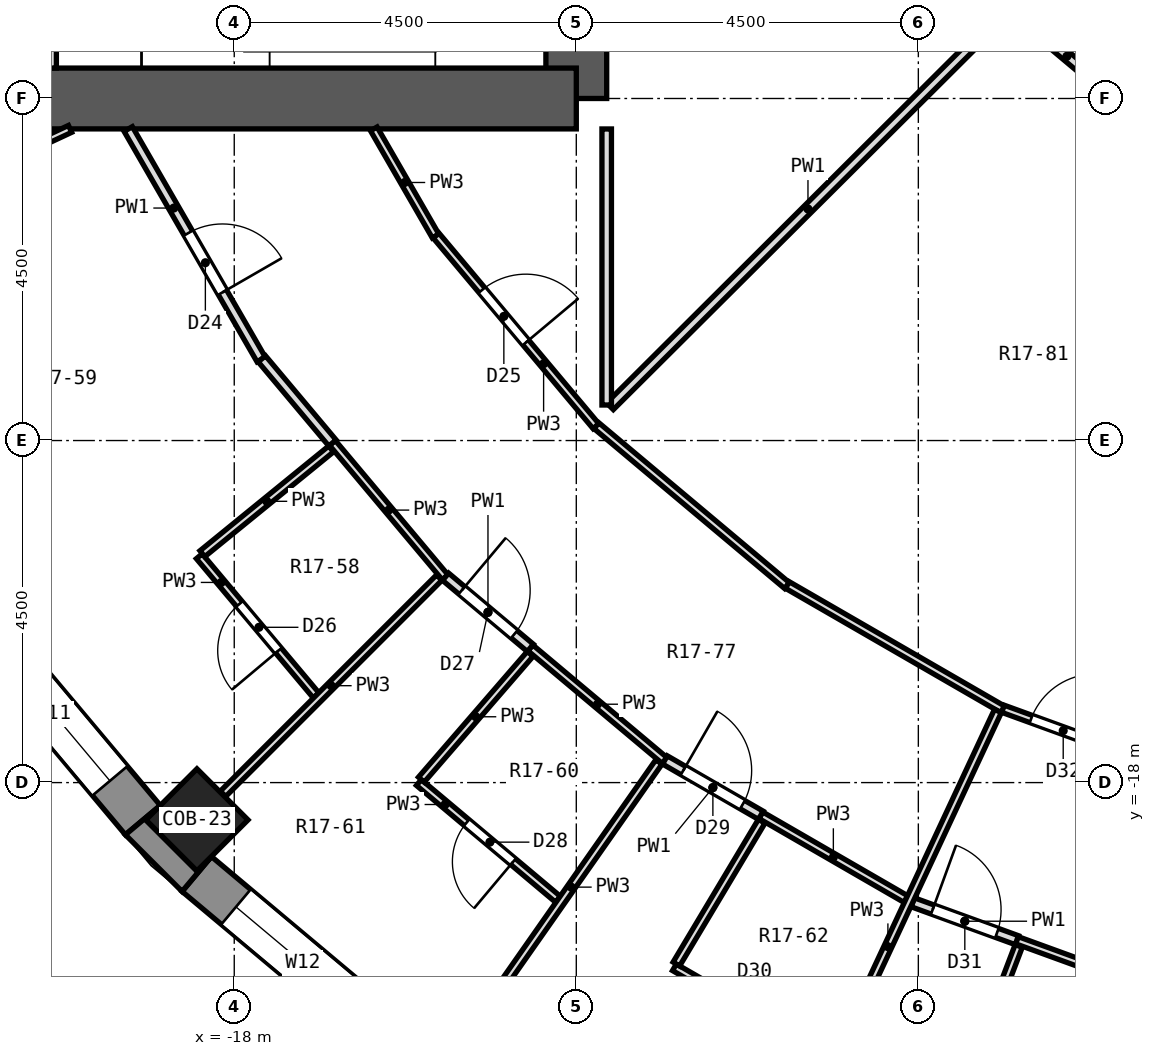
"""IFC4 building model, lengths in metres.
Left out: names, types, materials, properties, quantities, classifications, styles, units other than length and angle.
Written with IfcOpenShell. Run it as: python <this file> out.ifc"""

import sys

from ifc_helpers import new_model, si_unit, direction, frame, frame_2d, origin, origin_2d, place, context, subcontext, project, spatial, polyline, rectangle, outline, extrude, element, fill, save


model = new_model("IFC4")
c1 = context("Model", 3, precision=1e-05, world=origin(), true_north=direction((0.0, 1.0)))
c2 = subcontext(c1, "Body", "Model", "MODEL_VIEW")
j1 = project(units=[si_unit("LENGTHUNIT", "METRE"), si_unit("PLANEANGLEUNIT", "RADIAN")], contexts=[c1])
p1 = place(None, origin())
s1 = spatial("IfcSite", under=j1, at=p1, CompositionType="ELEMENT")
p2 = place(p1, origin())
s2 = spatial("IfcBuilding", under=s1, at=p2, CompositionType="ELEMENT")
p3 = place(p2, frame((0.0, 0.0, 91.9)))
s3 = spatial("IfcBuildingStorey", under=s2, at=p3, CompositionType="ELEMENT", Elevation=91.9)
p4 = place(p3, frame((-18.491, -18.491, 0.0), z_axis=(0.0, 0.0, 1.0), x_axis=(-0.707106781187, -0.707106781187, 0.0)))
e1 = element("IfcColumn", 1, at=p4, inside=s3, PredefinedType="COLUMN", context=c2, shape_type="SweptSolid", body=[
    extrude(rectangle(XDim=0.95, YDim=0.95, at=origin_2d()), origin(), (0.0, 0.0, 1.0), 3.3),
])
p5 = place(p3, frame((-13.5, -9.0, 0.0), z_axis=(0.0, 0.0, 1.0), x_axis=(0.0, 1.0, 0.0)))
e2 = element("IfcWall", 2, at=p5, inside=s3, PredefinedType="SHEAR", context=c2, shape_type="SweptSolid", body=[
    extrude(rectangle(XDim=18.0, YDim=0.8, at=frame_2d((9.0, 0.0))), origin(), (0.0, 0.0, 1.0), 3.3),
])
p6 = place(p5, frame((15.4, 0.0, 0.0)))
e3 = element("IfcOpeningElement", 3, at=p6, cuts=e2, PredefinedType="OPENING", context=c2, shape_type="SweptSolid", body=[
    extrude(rectangle(XDim=1.2, YDim=2.1, at=frame_2d((0.6, 1.05))), frame((0.0, 0.412, 0.0), z_axis=(0.0, -1.0, 0.0), x_axis=(1.0, 0.0, 0.0)), (0.0, 0.0, 1.0), 0.824),
])
p7 = place(p5, frame((1.4, 0.0, 0.0)))
e4 = element("IfcOpeningElement", 4, at=p7, cuts=e2, PredefinedType="OPENING", context=c2, shape_type="SweptSolid", body=[
    extrude(rectangle(XDim=1.2, YDim=2.1, at=frame_2d((0.6, 1.05))), frame((0.0, 0.412, 0.0), z_axis=(0.0, -1.0, 0.0), x_axis=(1.0, 0.0, 0.0)), (0.0, 0.0, 1.0), 0.824),
])
p8 = place(p5, frame((7.5, 0.0, 0.0)))
e5 = element("IfcOpeningElement", 5, at=p8, cuts=e2, PredefinedType="OPENING", context=c2, shape_type="SweptSolid", body=[
    extrude(rectangle(XDim=3.0, YDim=2.4, at=frame_2d((1.5, 1.2))), frame((0.0, 0.412, 0.0), z_axis=(0.0, -1.0, 0.0), x_axis=(1.0, 0.0, 0.0)), (0.0, 0.0, 1.0), 0.824),
])
p9 = place(p3, frame((-13.5, -9.0, 0.0), z_axis=(0.0, 0.0, 1.0), x_axis=(-1.0, 0.0, 0.0)))
e6 = element("IfcWall", 6, at=p9, inside=s3, PredefinedType="SHEAR", context=c2, shape_type="SweptSolid", body=[
    extrude(rectangle(XDim=10.4, YDim=0.8, at=frame_2d((5.2, 0.0))), origin(), (0.0, 0.0, 1.0), 3.3),
])
p10 = place(p3, frame((-21.547, -15.699, 0.0), z_axis=(0.0, 0.0, 1.0), x_axis=(0.642774476932, -0.766055462616, 0.0)))
e7 = element("IfcWall", 7, at=p10, inside=s3, PredefinedType="SOLIDWALL", context=c2, shape_type="SweptSolid", body=[
    extrude(rectangle(XDim=3.648, YDim=0.6, at=frame_2d((1.824, 0.0))), origin(), (0.0, 0.0, 1.0), 2.8),
])
p11 = place(p10, frame((0.674, 0.0, 0.9)))
e8 = element("IfcOpeningElement", 8, at=p11, cuts=e7, PredefinedType="OPENING", context=c2, shape_type="SweptSolid", body=[
    extrude(rectangle(XDim=2.3, YDim=1.8, at=frame_2d((1.15, 0.9))), frame((0.0, 0.312, 0.0), z_axis=(0.0, -1.0, 0.0), x_axis=(1.0, 0.0, 0.0)), (0.0, 0.0, 1.0), 0.624),
])
p12 = place(p3, frame((-18.494, -19.202, 0.0), z_axis=(0.0, 0.0, 1.0), x_axis=(0.766055462616, -0.642774476932, 0.0)))
e9 = element("IfcWall", 9, at=p12, inside=s3, PredefinedType="SOLIDWALL", context=c2, shape_type="SweptSolid", body=[
    extrude(rectangle(XDim=3.648, YDim=0.6, at=frame_2d((1.824, 0.0))), origin(), (0.0, 0.0, 1.0), 2.8),
])
p13 = place(p12, frame((0.674, 0.0, 0.9)))
e10 = element("IfcOpeningElement", 10, at=p13, cuts=e9, PredefinedType="OPENING", context=c2, shape_type="SweptSolid", body=[
    extrude(rectangle(XDim=2.3, YDim=1.8, at=frame_2d((1.15, 0.9))), frame((0.0, 0.312, 0.0), z_axis=(0.0, -1.0, 0.0), x_axis=(1.0, 0.0, 0.0)), (0.0, 0.0, 1.0), 0.624),
])
p14 = place(p3, origin())
e11 = element("IfcWall", 11, at=p14, inside=s3, PredefinedType="SOLIDWALL", context=c2, shape_type="SweptSolid", body=[
    extrude(outline(polyline([(-19.432, -18.686), (-18.686, -19.432), (-18.301, -18.972), (-18.491, -19.163), (-19.163, -18.491), (-18.972, -18.301), (-19.432, -18.686)])), origin(), (0.0, 0.0, 1.0), 2.8),
])
p15 = place(p3, frame((-19.395, -9.402, 0.0), z_axis=(0.0, 0.0, 1.0), x_axis=(0.499726480438, -0.866183262797, 0.0)))
e12 = element("IfcWall", 12, at=p15, inside=s3, PredefinedType="PARTITIONING", context=c2, shape_type="SweptSolid", body=[
    extrude(rectangle(XDim=3.499, YDim=0.125, at=frame_2d((1.75, 0.0))), origin(), (0.0, 0.0, 1.0), 2.8),
])
p16 = place(p15, frame((1.581, 0.0, 0.0)))
e13 = element("IfcOpeningElement", 13, at=p16, cuts=e12, PredefinedType="OPENING", context=c2, shape_type="SweptSolid", body=[
    extrude(rectangle(XDim=0.9, YDim=2.1, at=frame_2d((0.45, 1.05))), frame((0.0, 0.074, 0.0), z_axis=(0.0, -1.0, 0.0), x_axis=(1.0, 0.0, 0.0)), (0.0, 0.0, 1.0), 0.149),
])
p17 = place(p3, frame((-16.164, -9.4, 0.0), z_axis=(0.0, 0.0, 1.0), x_axis=(0.499687832671, -0.866205558676, 0.0)))
e14 = element("IfcWall", 14, at=p17, inside=s3, PredefinedType="PARTITIONING", context=c2, shape_type="SweptSolid", body=[
    extrude(rectangle(XDim=1.628, YDim=0.1, at=frame_2d((0.814, 0.0))), origin(), (0.0, 0.0, 1.0), 2.8),
])
p18 = place(p3, frame((-18.46, -15.022, 0.0), z_axis=(0.0, 0.0, 1.0), x_axis=(0.642942941421, -0.765914077477, 0.0)))
e15 = element("IfcWall", 15, at=p18, inside=s3, PredefinedType="PARTITIONING", context=c2, shape_type="SweptSolid", body=[
    extrude(rectangle(XDim=2.39, YDim=0.1, at=frame_2d((1.195, 0.0))), origin(), (0.0, 0.0, 1.0), 2.8),
])
p19 = place(p18, frame((0.821, 0.0, 0.0)))
e16 = element("IfcOpeningElement", 16, at=p19, cuts=e15, PredefinedType="OPENING", context=c2, shape_type="SweptSolid", body=[
    extrude(rectangle(XDim=0.8, YDim=2.1, at=frame_2d((0.4, 1.05))), frame((0.0, 0.062, 0.0), z_axis=(0.0, -1.0, 0.0), x_axis=(1.0, 0.0, 0.0)), (0.0, 0.0, 1.0), 0.124),
])
p20 = place(p3, frame((-16.708, -13.532, 0.0), z_axis=(0.0, 0.0, 1.0), x_axis=(0.642762571273, -0.766065452145, 0.0)))
e17 = element("IfcWall", 17, at=p20, inside=s3, PredefinedType="PARTITIONING", context=c2, shape_type="SweptSolid", body=[
    extrude(rectangle(XDim=2.307, YDim=0.1, at=frame_2d((1.153, 0.0))), origin(), (0.0, 0.0, 1.0), 2.8),
])
p21 = place(p3, frame((-17.637, -12.425, 0.0), z_axis=(0.0, 0.0, 1.0), x_axis=(0.642641061866, -0.766167387458, 0.0)))
e18 = element("IfcWall", 18, at=p21, inside=s3, PredefinedType="PARTITIONING", context=c2, shape_type="SweptSolid", body=[
    extrude(rectangle(XDim=1.445, YDim=0.125, at=frame_2d((0.722, 0.0))), origin(), (0.0, 0.0, 1.0), 2.8),
])
p22 = place(p3, frame((-15.344, -10.804, 0.0), z_axis=(0.0, 0.0, 1.0), x_axis=(0.642602374159, -0.766199836025, 0.0)))
e19 = element("IfcWall", 19, at=p22, inside=s3, PredefinedType="PARTITIONING", context=c2, shape_type="SweptSolid", body=[
    extrude(rectangle(XDim=3.273, YDim=0.1, at=frame_2d((1.636, 0.0))), origin(), (0.0, 0.0, 1.0), 2.8),
])
p23 = place(p22, frame((0.936, 0.0, 0.0)))
e20 = element("IfcOpeningElement", 20, at=p23, cuts=e19, PredefinedType="OPENING", context=c2, shape_type="SweptSolid", body=[
    extrude(rectangle(XDim=0.9, YDim=2.1, at=frame_2d((0.45, 1.05))), frame((0.0, 0.062, 0.0), z_axis=(0.0, -1.0, 0.0), x_axis=(1.0, 0.0, 0.0)), (0.0, 0.0, 1.0), 0.124),
])
p24 = place(p3, frame((-15.571, -17.999, 0.0), z_axis=(0.0, 0.0, 1.0), x_axis=(0.765914077477, -0.642942941421, 0.0)))
e21 = element("IfcWall", 21, at=p24, inside=s3, PredefinedType="PARTITIONING", context=c2, shape_type="SweptSolid", body=[
    extrude(rectangle(XDim=2.39, YDim=0.1, at=frame_2d((1.195, 0.0))), origin(), (0.0, 0.0, 1.0), 2.8),
])
p25 = place(p24, frame((0.82, 0.0, 0.0)))
e22 = element("IfcOpeningElement", 22, at=p25, cuts=e21, PredefinedType="OPENING", context=c2, shape_type="SweptSolid", body=[
    extrude(rectangle(XDim=0.8, YDim=2.1, at=frame_2d((0.4, 1.05))), frame((0.0, 0.062, 0.0), z_axis=(0.0, -1.0, 0.0), x_axis=(1.0, 0.0, 0.0)), (0.0, 0.0, 1.0), 0.124),
])
p26 = place(p3, frame((-14.104, -16.228, 0.0), z_axis=(0.0, 0.0, 1.0), x_axis=(0.76604687987, -0.642784705669, 0.0)))
e23 = element("IfcWall", 23, at=p26, inside=s3, PredefinedType="PARTITIONING", context=c2, shape_type="SweptSolid", body=[
    extrude(rectangle(XDim=2.305, YDim=0.1, at=frame_2d((1.153, 0.0))), origin(), (0.0, 0.0, 1.0), 2.8),
])
p27 = place(p3, frame((-15.22, -15.292, 0.0), z_axis=(0.0, 0.0, 1.0), x_axis=(0.766114305984, -0.642704341177, 0.0)))
e24 = element("IfcWall", 24, at=p27, inside=s3, PredefinedType="PARTITIONING", context=c2, shape_type="SweptSolid", body=[
    extrude(rectangle(XDim=1.456, YDim=0.125, at=frame_2d((0.728, 0.0))), origin(), (0.0, 0.0, 1.0), 2.8),
])
p28 = place(p27, frame((0.278, 0.0, 0.0)))
e25 = element("IfcOpeningElement", 25, at=p28, cuts=e24, PredefinedType="OPENING", context=c2, shape_type="SweptSolid", body=[
    extrude(rectangle(XDim=0.9, YDim=2.1, at=frame_2d((0.45, 1.05))), frame((0.0, 0.074, 0.0), z_axis=(0.0, -1.0, 0.0), x_axis=(1.0, 0.0, 0.0)), (0.0, 0.0, 1.0), 0.149),
])
p29 = place(p3, frame((-13.235, -13.305, 0.0), z_axis=(0.0, 0.0, 1.0), x_axis=(0.766132303871, -0.642682886784, 0.0)))
e26 = element("IfcWall", 26, at=p29, inside=s3, PredefinedType="PARTITIONING", context=c2, shape_type="SweptSolid", body=[
    extrude(rectangle(XDim=3.273, YDim=0.1, at=frame_2d((1.636, 0.0))), origin(), (0.0, 0.0, 1.0), 2.8),
])
p30 = place(p3, frame((-7.807, -7.806, 0.0), z_axis=(0.0, 0.0, 1.0), x_axis=(0.766164240715, -0.642644813446, 0.0)))
e27 = element("IfcWall", 27, at=p30, inside=s3, PredefinedType="PARTITIONING", context=c2, shape_type="SweptSolid", body=[
    extrude(rectangle(XDim=1.988, YDim=0.125, at=frame_2d((0.994, 0.0))), origin(), (0.0, 0.0, 1.0), 2.8),
])
p31 = place(p3, frame((-12.209, -20.43, 0.0), z_axis=(0.0, 0.0, 1.0), x_axis=(0.865989934965, -0.500061428766, 0.0)))
e28 = element("IfcWall", 28, at=p31, inside=s3, PredefinedType="PARTITIONING", context=c2, shape_type="SweptSolid", body=[
    extrude(rectangle(XDim=2.39, YDim=0.1, at=frame_2d((1.195, 0.0))), origin(), (0.0, 0.0, 1.0), 2.8),
])
p32 = place(p31, frame((0.82, 0.0, 0.0)))
e29 = element("IfcOpeningElement", 29, at=p32, cuts=e28, PredefinedType="OPENING", context=c2, shape_type="SweptSolid", body=[
    extrude(rectangle(XDim=0.8, YDim=2.1, at=frame_2d((0.4, 1.05))), frame((0.0, 0.062, 0.0), z_axis=(0.0, -1.0, 0.0), x_axis=(1.0, 0.0, 0.0)), (0.0, 0.0, 1.0), 0.124),
])
p33 = place(p3, frame((-11.072, -18.43, 0.0), z_axis=(0.0, 0.0, 1.0), x_axis=(0.865848017448, -0.500307116361, 0.0)))
e30 = element("IfcWall", 30, at=p33, inside=s3, PredefinedType="PARTITIONING", context=c2, shape_type="SweptSolid", body=[
    extrude(rectangle(XDim=2.205, YDim=0.1, at=frame_2d((1.102, 0.0))), origin(), (0.0, 0.0, 1.0), 2.8),
])
p34 = place(p3, frame((-12.334, -17.702, 0.0), z_axis=(0.0, 0.0, 1.0), x_axis=(0.866110229381, -0.499853048967, 0.0)))
e31 = element("IfcWall", 31, at=p34, inside=s3, PredefinedType="PARTITIONING", context=c2, shape_type="SweptSolid", body=[
    extrude(rectangle(XDim=1.457, YDim=0.125, at=frame_2d((0.728, 0.0))), origin(), (0.0, 0.0, 1.0), 2.8),
])
p35 = place(p34, frame((0.278, 0.0, 0.0)))
e32 = element("IfcOpeningElement", 32, at=p35, cuts=e31, PredefinedType="OPENING", context=c2, shape_type="SweptSolid", body=[
    extrude(rectangle(XDim=0.9, YDim=2.1, at=frame_2d((0.45, 1.05))), frame((0.0, 0.074, 0.0), z_axis=(0.0, -1.0, 0.0), x_axis=(1.0, 0.0, 0.0)), (0.0, 0.0, 1.0), 0.149),
])
p36 = place(p3, frame((-10.723, -15.401, 0.0), z_axis=(0.0, 0.0, 1.0), x_axis=(0.866002935623, -0.500038913978, 0.0)))
e33 = element("IfcWall", 33, at=p36, inside=s3, PredefinedType="PARTITIONING", context=c2, shape_type="SweptSolid", body=[
    extrude(rectangle(XDim=3.272, YDim=0.1, at=frame_2d((1.636, 0.0))), origin(), (0.0, 0.0, 1.0), 2.8),
])
p37 = place(p3, frame((-7.704, -20.073, 0.0), z_axis=(0.0, 0.0, 1.0), x_axis=(0.939734670151, -0.34190459154, 0.0)))
e34 = element("IfcWall", 34, at=p37, inside=s3, PredefinedType="PARTITIONING", context=c2, shape_type="SweptSolid", body=[
    extrude(rectangle(XDim=2.306, YDim=0.1, at=frame_2d((1.153, 0.0))), origin(), (0.0, 0.0, 1.0), 2.8),
])
p38 = place(p3, frame((-9.073, -19.575, 0.0), z_axis=(0.0, 0.0, 1.0), x_axis=(0.939788529673, -0.341756520778, 0.0)))
e35 = element("IfcWall", 35, at=p38, inside=s3, PredefinedType="PARTITIONING", context=c2, shape_type="SweptSolid", body=[
    extrude(rectangle(XDim=1.457, YDim=0.125, at=frame_2d((0.728, 0.0))), origin(), (0.0, 0.0, 1.0), 2.8),
])
p39 = place(p38, frame((0.278, 0.0, 0.0)))
e36 = element("IfcOpeningElement", 36, at=p39, cuts=e35, PredefinedType="OPENING", context=c2, shape_type="SweptSolid", body=[
    extrude(rectangle(XDim=0.9, YDim=2.1, at=frame_2d((0.45, 1.05))), frame((0.0, 0.074, 0.0), z_axis=(0.0, -1.0, 0.0), x_axis=(1.0, 0.0, 0.0)), (0.0, 0.0, 1.0), 0.149),
])
p40 = place(p3, frame((-7.886, -17.029, 0.0), z_axis=(0.0, 0.0, 1.0), x_axis=(0.939806110693, -0.341708171258, 0.0)))
e37 = element("IfcWall", 37, at=p40, inside=s3, PredefinedType="PARTITIONING", context=c2, shape_type="SweptSolid", body=[
    extrude(rectangle(XDim=1.686, YDim=0.1, at=frame_2d((0.843, 0.0))), origin(), (0.0, 0.0, 1.0), 2.8),
])
p41 = place(p40, frame((0.393, 0.0, 0.0)))
e38 = element("IfcOpeningElement", 38, at=p41, cuts=e37, PredefinedType="OPENING", context=c2, shape_type="SweptSolid", body=[
    extrude(rectangle(XDim=0.9, YDim=2.1, at=frame_2d((0.45, 1.05))), frame((0.0, 0.062, 0.0), z_axis=(0.0, -1.0, 0.0), x_axis=(1.0, 0.0, 0.0)), (0.0, 0.0, 1.0), 0.124),
])
p42 = place(p3, frame((-23.26, -10.847, 0.0), z_axis=(0.0, 0.0, 1.0), x_axis=(0.906121146584, 0.423018282954, 0.0)))
e39 = element("IfcWall", 39, at=p42, inside=s3, PredefinedType="PARTITIONING", context=c2, shape_type="SweptSolid", body=[
    extrude(rectangle(XDim=3.421, YDim=0.1, at=frame_2d((1.711, 0.0))), origin(), (0.0, 0.0, 1.0), 2.8),
])
p43 = place(p3, frame((-18.419, -14.989, 0.0), z_axis=(0.0, 0.0, 1.0), x_axis=(0.775583643893, 0.63124481093, 0.0)))
e40 = element("IfcWall", 40, at=p43, inside=s3, PredefinedType="PARTITIONING", context=c2, shape_type="SweptSolid", body=[
    extrude(rectangle(XDim=2.184, YDim=0.1, at=frame_2d((1.092, 0.0))), origin(), (0.0, 0.0, 1.0), 2.8),
])
p44 = place(p3, frame((-13.057, -13.049, 0.0), z_axis=(0.0, 0.0, 1.0), x_axis=(0.708367099834, 0.705844212183, 0.0)))
e41 = element("IfcWall", 41, at=p44, inside=s3, PredefinedType="PARTITIONING", context=c2, shape_type="SweptSolid", body=[
    extrude(rectangle(XDim=7.354, YDim=0.125, at=frame_2d((3.677, 0.0))), origin(), (0.0, 0.0, 1.0), 2.8),
])
p45 = place(p3, frame((-18.148, -18.148, 0.0), z_axis=(0.0, 0.0, 1.0), x_axis=(0.707106781187, 0.707106781187, 0.0)))
e42 = element("IfcWall", 42, at=p45, inside=s3, PredefinedType="PARTITIONING", context=c2, shape_type="SweptSolid", body=[
    extrude(rectangle(XDim=4.023, YDim=0.1, at=frame_2d((2.011, 0.0))), origin(), (0.0, 0.0, 1.0), 2.8),
])
p46 = place(p3, frame((-15.538, -17.961, 0.0), z_axis=(0.0, 0.0, 1.0), x_axis=(0.654433202149, 0.756119821143, 0.0)))
e43 = element("IfcWall", 43, at=p46, inside=s3, PredefinedType="PARTITIONING", context=c2, shape_type="SweptSolid", body=[
    extrude(rectangle(XDim=2.187, YDim=0.1, at=frame_2d((1.094, 0.0))), origin(), (0.0, 0.0, 1.0), 2.8),
])
p47 = place(p3, frame((-14.721, -21.023, 0.0), z_axis=(0.0, 0.0, 1.0), x_axis=(0.573849206175, 0.818960981105, 0.0)))
e44 = element("IfcWall", 44, at=p47, inside=s3, PredefinedType="PARTITIONING", context=c2, shape_type="SweptSolid", body=[
    extrude(rectangle(XDim=4.023, YDim=0.1, at=frame_2d((2.011, 0.0))), origin(), (0.0, 0.0, 1.0), 2.8),
])
p48 = place(p3, frame((-12.183, -20.387, 0.0), z_axis=(0.0, 0.0, 1.0), x_axis=(0.512903306279, 0.85844638645, 0.0)))
e45 = element("IfcWall", 45, at=p48, inside=s3, PredefinedType="PARTITIONING", context=c2, shape_type="SweptSolid", body=[
    extrude(rectangle(XDim=2.188, YDim=0.1, at=frame_2d((1.094, 0.0))), origin(), (0.0, 0.0, 1.0), 2.8),
])
p49 = place(p3, frame((-10.848, -23.26, 0.0), z_axis=(0.0, 0.0, 1.0), x_axis=(0.422908898334, 0.906172204225, 0.0)))
e46 = element("IfcWall", 46, at=p49, inside=s3, PredefinedType="PARTITIONING", context=c2, shape_type="SweptSolid", body=[
    extrude(rectangle(XDim=6.844, YDim=0.1, at=frame_2d((3.422, 0.0))), origin(), (0.0, 0.0, 1.0), 2.8),
])
p50 = place(p3, frame((-8.458, -22.192, 0.0), z_axis=(0.0, 0.0, 1.0), x_axis=(0.356134598474, 0.93443466747, 0.0)))
e47 = element("IfcWall", 47, at=p50, inside=s3, PredefinedType="PARTITIONING", context=c2, shape_type="SweptSolid", body=[
    extrude(rectangle(XDim=2.187, YDim=0.1, at=frame_2d((1.093, 0.0))), origin(), (0.0, 0.0, 1.0), 2.8),
])
p51 = place(p3, frame((-13.1, -13.032, 0.0), z_axis=(0.0, 0.0, 1.0), x_axis=(0.0, 1.0, 0.0)))
e48 = element("IfcWall", 48, at=p51, inside=s3, PredefinedType="PARTITIONING", context=c2, shape_type="SweptSolid", body=[
    extrude(rectangle(XDim=3.632, YDim=0.125, at=frame_2d((1.816, 0.0))), origin(), (0.0, 0.0, 1.0), 2.8),
])
p52 = place(p3, frame((-20.39, -8.6, 0.0), z_axis=(0.0, 0.0, 1.0), x_axis=(0.0, 1.0, 0.0)))
e49 = element("IfcWall", 49, at=p52, inside=s3, PredefinedType="PARTITIONING", context=c2, shape_type="SweptSolid", body=[
    extrude(rectangle(XDim=3.35, YDim=0.1, at=frame_2d((1.675, 0.0))), origin(), (0.0, 0.0, 1.0), 2.8),
])
p53 = place(p11, origin())
e50 = element("IfcWindow", 50, at=p53, inside=s3, PartitioningType="SINGLE_PANEL", PredefinedType="WINDOW", context=c2, shape_type="SweptSolid", body=[
    extrude(rectangle(XDim=2.3, YDim=1.8, at=frame_2d((1.15, 0.9))), frame((0.0, 0.18, 0.0), z_axis=(0.0, -1.0, 0.0), x_axis=(1.0, 0.0, 0.0)), (0.0, 0.0, 1.0), 0.06),
])
fill(e8, e50)
p54 = place(p13, origin())
e51 = element("IfcWindow", 51, at=p54, inside=s3, PartitioningType="SINGLE_PANEL", PredefinedType="WINDOW", context=c2, shape_type="SweptSolid", body=[
    extrude(rectangle(XDim=2.3, YDim=1.8, at=frame_2d((1.15, 0.9))), frame((0.0, 0.18, 0.0), z_axis=(0.0, -1.0, 0.0), x_axis=(1.0, 0.0, 0.0)), (0.0, 0.0, 1.0), 0.06),
])
fill(e10, e51)
p55 = place(p16, origin())
e52 = element("IfcDoor", 52, at=p55, inside=s3, OperationType="SINGLE_SWING_RIGHT", PredefinedType="DOOR", context=c2, shape_type="SweptSolid", body=[
    extrude(rectangle(XDim=0.9, YDim=2.1, at=frame_2d((0.45, 1.05))), frame((0.0, 0.025, 0.0), z_axis=(0.0, -1.0, 0.0), x_axis=(1.0, 0.0, 0.0)), (0.0, 0.0, 1.0), 0.05),
])
fill(e13, e52)
p56 = place(p23, origin())
e53 = element("IfcDoor", 53, at=p56, inside=s3, OperationType="SINGLE_SWING_RIGHT", PredefinedType="DOOR", context=c2, shape_type="SweptSolid", body=[
    extrude(rectangle(XDim=0.9, YDim=2.1, at=frame_2d((0.45, 1.05))), frame((0.0, 0.025, 0.0), z_axis=(0.0, -1.0, 0.0), x_axis=(1.0, 0.0, 0.0)), (0.0, 0.0, 1.0), 0.05),
])
fill(e20, e53)
p57 = place(p19, frame((0.8, 0.0, 0.0), z_axis=(0.0, 0.0, 1.0), x_axis=(-1.0, 0.0, 0.0)))
e54 = element("IfcDoor", 54, at=p57, inside=s3, OperationType="SINGLE_SWING_LEFT", PredefinedType="DOOR", context=c2, shape_type="SweptSolid", body=[
    extrude(rectangle(XDim=0.8, YDim=2.1, at=frame_2d((0.4, 1.05))), frame((0.0, 0.025, 0.0), z_axis=(0.0, -1.0, 0.0), x_axis=(1.0, 0.0, 0.0)), (0.0, 0.0, 1.0), 0.05),
])
fill(e16, e54)
p58 = place(p28, origin())
e55 = element("IfcDoor", 55, at=p58, inside=s3, OperationType="SINGLE_SWING_LEFT", PredefinedType="DOOR", context=c2, shape_type="SweptSolid", body=[
    extrude(rectangle(XDim=0.9, YDim=2.1, at=frame_2d((0.45, 1.05))), frame((0.0, 0.025, 0.0), z_axis=(0.0, -1.0, 0.0), x_axis=(1.0, 0.0, 0.0)), (0.0, 0.0, 1.0), 0.05),
])
fill(e25, e55)
p59 = place(p25, frame((0.8, 0.0, 0.0), z_axis=(0.0, 0.0, 1.0), x_axis=(-1.0, 0.0, 0.0)))
e56 = element("IfcDoor", 56, at=p59, inside=s3, OperationType="SINGLE_SWING_LEFT", PredefinedType="DOOR", context=c2, shape_type="SweptSolid", body=[
    extrude(rectangle(XDim=0.8, YDim=2.1, at=frame_2d((0.4, 1.05))), frame((0.0, 0.025, 0.0), z_axis=(0.0, -1.0, 0.0), x_axis=(1.0, 0.0, 0.0)), (0.0, 0.0, 1.0), 0.05),
])
fill(e22, e56)
p60 = place(p35, origin())
e57 = element("IfcDoor", 57, at=p60, inside=s3, OperationType="SINGLE_SWING_LEFT", PredefinedType="DOOR", context=c2, shape_type="SweptSolid", body=[
    extrude(rectangle(XDim=0.9, YDim=2.1, at=frame_2d((0.45, 1.05))), frame((0.0, 0.025, 0.0), z_axis=(0.0, -1.0, 0.0), x_axis=(1.0, 0.0, 0.0)), (0.0, 0.0, 1.0), 0.05),
])
fill(e32, e57)
p61 = place(p39, origin())
e58 = element("IfcDoor", 58, at=p61, inside=s3, OperationType="SINGLE_SWING_LEFT", PredefinedType="DOOR", context=c2, shape_type="SweptSolid", body=[
    extrude(rectangle(XDim=0.9, YDim=2.1, at=frame_2d((0.45, 1.05))), frame((0.0, 0.025, 0.0), z_axis=(0.0, -1.0, 0.0), x_axis=(1.0, 0.0, 0.0)), (0.0, 0.0, 1.0), 0.05),
])
fill(e36, e58)
p62 = place(p41, origin())
e59 = element("IfcDoor", 59, at=p62, inside=s3, OperationType="SINGLE_SWING_RIGHT", PredefinedType="DOOR", context=c2, shape_type="SweptSolid", body=[
    extrude(rectangle(XDim=0.9, YDim=2.1, at=frame_2d((0.45, 1.05))), frame((0.0, 0.025, 0.0), z_axis=(0.0, -1.0, 0.0), x_axis=(1.0, 0.0, 0.0)), (0.0, 0.0, 1.0), 0.05),
])
fill(e38, e59)
save(model, sys.argv[1])
